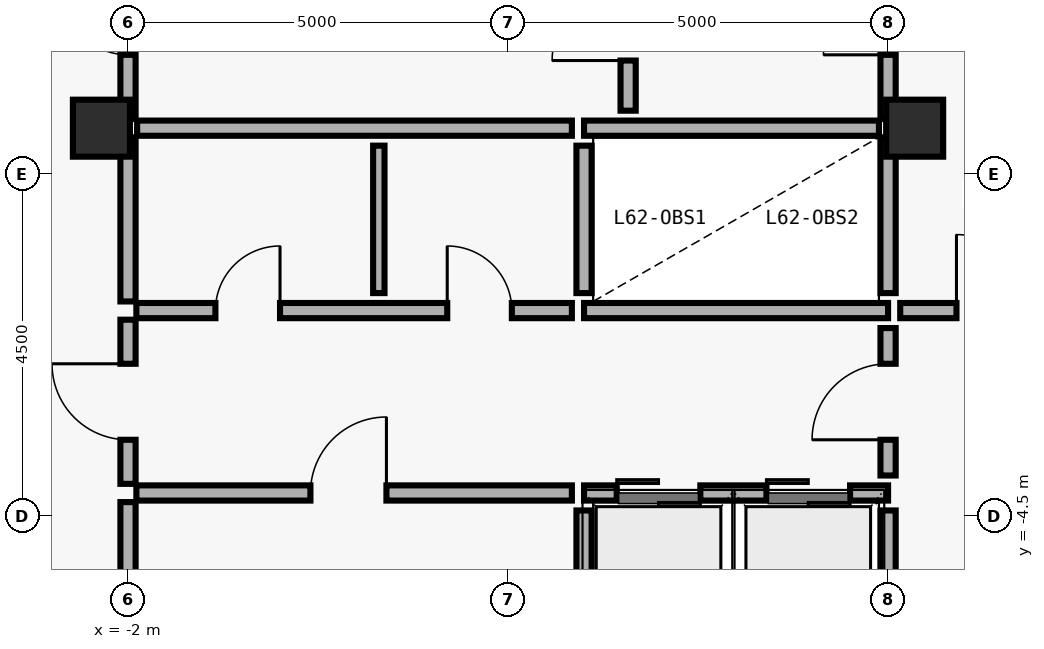
"""IFC4 building model, lengths in metres.
Left out: names, types, materials, properties, quantities, classifications, styles, units other than length and angle.
Written with IfcOpenShell. Run it as: python <this file> out.ifc"""

import sys

from ifc_helpers import new_model, si_unit, direction, frame, frame_2d, origin, origin_2d, place, context, subcontext, project, spatial, rectangle, extrude, element, fill, save


model = new_model("IFC4")
c1 = context("Model", 3, precision=1e-05, world=origin(), true_north=direction((0.0, 1.0)))
c2 = subcontext(c1, "Body", "Model", "MODEL_VIEW")
j1 = project(units=[si_unit("LENGTHUNIT", "METRE"), si_unit("PLANEANGLEUNIT", "RADIAN")], contexts=[c1])
p1 = place(None, origin())
s1 = spatial("IfcSite", under=j1, at=p1, CompositionType="ELEMENT")
p2 = place(p1, origin())
s2 = spatial("IfcBuilding", under=s1, at=p2, CompositionType="ELEMENT")
p3 = place(p2, frame((0.0, 0.0, 245.4)))
s3 = spatial("IfcBuildingStorey", under=s2, at=p3, CompositionType="ELEMENT", Elevation=245.4)
for number, where, z_axis, x_axis in (
    (1, (-2.35, 0.6, 0.0), (0.0, 0.0, 1.0), (1.0, 0.0, 0.0)),
    (2, (8.35, 0.6, 0.0), (0.0, 0.0, 1.0), (1.0, 0.0, 0.0)),
):
    element("IfcColumn", number, at=place(p3, frame(where, z_axis=z_axis, x_axis=x_axis)), inside=s3, PredefinedType="COLUMN", context=c2, shape_type="SweptSolid", body=[
        extrude(rectangle(XDim=0.75, YDim=0.75, at=origin_2d()), origin(), (0.0, 0.0, 1.0), 3.575),
    ])
p4 = place(p3, frame((4.0, 0.6, 0.0), z_axis=(0.0, 0.0, 1.0), x_axis=(1.0, 0.0, 0.0)))
e3 = element("IfcWall", 3, at=p4, inside=s3, PredefinedType="SOLIDWALL", context=c2, shape_type="SweptSolid", body=[
    extrude(rectangle(XDim=3.88, YDim=0.2, at=frame_2d((1.94, 0.0))), origin(), (0.0, 0.0, 1.0), 3.072),
])
p5 = place(p3, frame((4.0, -1.8, 0.0), z_axis=(0.0, 0.0, 1.0), x_axis=(1.0, 0.0, 0.0)))
e4 = element("IfcWall", 4, at=p5, inside=s3, PredefinedType="SOLIDWALL", context=c2, shape_type="SweptSolid", body=[
    extrude(rectangle(XDim=4.0, YDim=0.2, at=frame_2d((2.0, 0.0))), origin(), (0.0, 0.0, 1.0), 3.36),
])
p6 = place(p3, frame((4.0, -1.57, 0.0), z_axis=(0.0, 0.0, 1.0), x_axis=(0.0, 1.0, 0.0)))
e5 = element("IfcWall", 5, at=p6, inside=s3, PredefinedType="SOLIDWALL", context=c2, shape_type="SweptSolid", body=[
    extrude(rectangle(XDim=1.94, YDim=0.2, at=frame_2d((0.97, 0.0))), origin(), (0.0, 0.0, 1.0), 3.36),
])
p7 = place(p3, frame((8.0, -1.57, 0.0), z_axis=(0.0, 0.0, 1.0), x_axis=(0.0, 1.0, 0.0)))
e6 = element("IfcWall", 6, at=p7, inside=s3, PredefinedType="SOLIDWALL", context=c2, shape_type="SweptSolid", body=[
    extrude(rectangle(XDim=2.05, YDim=0.2, at=frame_2d((1.025, 0.0))), origin(), (0.0, 0.0, 1.0), 3.072),
])
p8 = place(p3, frame((4.0, -4.2, 0.0), z_axis=(0.0, 0.0, 1.0), x_axis=(1.0, 0.0, 0.0)))
e7 = element("IfcWall", 7, at=p8, inside=s3, PredefinedType="SOLIDWALL", context=c2, shape_type="SweptSolid", body=[
    extrude(rectangle(XDim=4.0, YDim=0.2, at=frame_2d((2.0, 0.0))), origin(), (0.0, 0.0, 1.0), 3.36),
])
p9 = place(p8, frame((0.43, 0.0, 0.0)))
e8 = element("IfcOpeningElement", 8, at=p9, cuts=e7, PredefinedType="OPENING", context=c2, shape_type="SweptSolid", body=[
    extrude(rectangle(XDim=1.1, YDim=2.2, at=frame_2d((0.55, 1.1))), frame((0.0, 0.11, 0.0), z_axis=(0.0, -1.0, 0.0), x_axis=(1.0, 0.0, 0.0)), (0.0, 0.0, 1.0), 0.22),
])
p10 = place(p8, frame((2.4, 0.0, 0.0)))
e9 = element("IfcOpeningElement", 9, at=p10, cuts=e7, PredefinedType="OPENING", context=c2, shape_type="SweptSolid", body=[
    extrude(rectangle(XDim=1.1, YDim=2.2, at=frame_2d((0.55, 1.1))), frame((0.0, 0.11, 0.0), z_axis=(0.0, -1.0, 0.0), x_axis=(1.0, 0.0, 0.0)), (0.0, 0.0, 1.0), 0.22),
])
p11 = place(p3, frame((4.0, -6.37, 0.0), z_axis=(0.0, 0.0, 1.0), x_axis=(0.0, 1.0, 0.0)))
e10 = element("IfcWall", 10, at=p11, inside=s3, PredefinedType="SOLIDWALL", context=c2, shape_type="SweptSolid", body=[
    extrude(rectangle(XDim=1.94, YDim=0.2, at=frame_2d((0.97, 0.0))), origin(), (0.0, 0.0, 1.0), 3.36),
])
p12 = place(p3, frame((8.0, -6.37, 0.0), z_axis=(0.0, 0.0, 1.0), x_axis=(0.0, 1.0, 0.0)))
e11 = element("IfcWall", 11, at=p12, inside=s3, PredefinedType="SOLIDWALL", context=c2, shape_type="SweptSolid", body=[
    extrude(rectangle(XDim=1.94, YDim=0.2, at=frame_2d((0.97, 0.0))), origin(), (0.0, 0.0, 1.0), 3.072),
])
p13 = place(p3, frame((4.58, 0.83, 0.0), z_axis=(0.0, 0.0, 1.0), x_axis=(0.0, 1.0, 0.0)))
e12 = element("IfcWall", 12, at=p13, inside=s3, PredefinedType="MOVABLE", context=c2, shape_type="SweptSolid", body=[
    extrude(rectangle(XDim=2.24, YDim=0.2, at=frame_2d((1.12, 0.0))), origin(), (0.0, 0.0, 1.0), 3.36),
])
p14 = place(p13, frame((0.66, 0.0, 0.0)))
e13 = element("IfcOpeningElement", 13, at=p14, cuts=e12, PredefinedType="OPENING", context=c2, shape_type="SweptSolid", body=[
    extrude(rectangle(XDim=1.0, YDim=2.1, at=frame_2d((0.5, 1.05))), frame((0.0, 0.11, 0.0), z_axis=(0.0, -1.0, 0.0), x_axis=(1.0, 0.0, 0.0)), (0.0, 0.0, 1.0), 0.22),
])
p15 = place(p3, frame((-2.0, 0.72, 0.0), z_axis=(0.0, 0.0, 1.0), x_axis=(0.0, 1.0, 0.0)))
e14 = element("IfcWall", 14, at=p15, inside=s3, PredefinedType="MOVABLE", context=c2, shape_type="SweptSolid", body=[
    extrude(rectangle(XDim=2.35, YDim=0.2, at=frame_2d((1.175, 0.0))), origin(), (0.0, 0.0, 1.0), 2.692),
])
p16 = place(p15, frame((0.845, 0.0, 0.0)))
e15 = element("IfcOpeningElement", 15, at=p16, cuts=e14, PredefinedType="OPENING", context=c2, shape_type="SweptSolid", body=[
    extrude(rectangle(XDim=0.85, YDim=2.1, at=frame_2d((0.425, 1.05))), frame((0.0, 0.11, 0.0), z_axis=(0.0, -1.0, 0.0), x_axis=(1.0, 0.0, 0.0)), (0.0, 0.0, 1.0), 0.22),
])
p17 = place(p3, frame((8.0, 0.72, 0.0), z_axis=(0.0, 0.0, 1.0), x_axis=(0.0, 1.0, 0.0)))
e16 = element("IfcWall", 16, at=p17, inside=s3, PredefinedType="MOVABLE", context=c2, shape_type="SweptSolid", body=[
    extrude(rectangle(XDim=2.35, YDim=0.2, at=frame_2d((1.175, 0.0))), origin(), (0.0, 0.0, 1.0), 2.692),
])
p18 = place(p17, frame((0.845, 0.0, 0.0)))
e17 = element("IfcOpeningElement", 17, at=p18, cuts=e16, PredefinedType="OPENING", context=c2, shape_type="SweptSolid", body=[
    extrude(rectangle(XDim=0.85, YDim=2.1, at=frame_2d((0.425, 1.05))), frame((0.0, 0.11, 0.0), z_axis=(0.0, -1.0, 0.0), x_axis=(1.0, 0.0, 0.0)), (0.0, 0.0, 1.0), 0.22),
])
p19 = place(p3, frame((-2.0, -4.08, 0.0), z_axis=(0.0, 0.0, 1.0), x_axis=(0.0, 1.0, 0.0)))
e18 = element("IfcWall", 18, at=p19, inside=s3, PredefinedType="MOVABLE", context=c2, shape_type="SweptSolid", body=[
    extrude(rectangle(XDim=2.16, YDim=0.2, at=frame_2d((1.08, 0.0))), origin(), (0.0, 0.0, 1.0), 3.072),
])
p20 = place(p19, frame((0.58, 0.0, 0.0)))
e19 = element("IfcOpeningElement", 19, at=p20, cuts=e18, PredefinedType="OPENING", context=c2, shape_type="SweptSolid", body=[
    extrude(rectangle(XDim=1.0, YDim=2.1, at=frame_2d((0.5, 1.05))), frame((0.0, 0.11, 0.0), z_axis=(0.0, -1.0, 0.0), x_axis=(1.0, 0.0, 0.0)), (0.0, 0.0, 1.0), 0.22),
])
p21 = place(p3, frame((8.0, -3.97, 0.0), z_axis=(0.0, 0.0, 1.0), x_axis=(0.0, 1.0, 0.0)))
e20 = element("IfcWall", 20, at=p21, inside=s3, PredefinedType="MOVABLE", context=c2, shape_type="SweptSolid", body=[
    extrude(rectangle(XDim=1.94, YDim=0.2, at=frame_2d((0.97, 0.0))), origin(), (0.0, 0.0, 1.0), 3.072),
])
p22 = place(p21, frame((0.47, 0.0, 0.0)))
e21 = element("IfcOpeningElement", 21, at=p22, cuts=e20, PredefinedType="OPENING", context=c2, shape_type="SweptSolid", body=[
    extrude(rectangle(XDim=1.0, YDim=2.1, at=frame_2d((0.5, 1.05))), frame((0.0, 0.11, 0.0), z_axis=(0.0, -1.0, 0.0), x_axis=(1.0, 0.0, 0.0)), (0.0, 0.0, 1.0), 0.22),
])
p23 = place(p3, frame((-1.89, -1.8, 0.0), z_axis=(0.0, 0.0, 1.0), x_axis=(1.0, 0.0, 0.0)))
e22 = element("IfcWall", 22, at=p23, inside=s3, PredefinedType="MOVABLE", context=c2, shape_type="SweptSolid", body=[
    extrude(rectangle(XDim=5.73, YDim=0.2, at=frame_2d((2.865, 0.0))), origin(), (0.0, 0.0, 1.0), 3.36),
])
p24 = place(p23, frame((1.04, 0.0, 0.0)))
e23 = element("IfcOpeningElement", 23, at=p24, cuts=e22, PredefinedType="OPENING", context=c2, shape_type="SweptSolid", body=[
    extrude(rectangle(XDim=0.85, YDim=2.1, at=frame_2d((0.425, 1.05))), frame((0.0, 0.11, 0.0), z_axis=(0.0, -1.0, 0.0), x_axis=(1.0, 0.0, 0.0)), (0.0, 0.0, 1.0), 0.22),
])
p25 = place(p23, frame((4.09, 0.0, 0.0)))
e24 = element("IfcOpeningElement", 24, at=p25, cuts=e22, PredefinedType="OPENING", context=c2, shape_type="SweptSolid", body=[
    extrude(rectangle(XDim=0.85, YDim=2.1, at=frame_2d((0.425, 1.05))), frame((0.0, 0.11, 0.0), z_axis=(0.0, -1.0, 0.0), x_axis=(1.0, 0.0, 0.0)), (0.0, 0.0, 1.0), 0.22),
])
p26 = place(p3, frame((-1.89, -4.2, 0.0), z_axis=(0.0, 0.0, 1.0), x_axis=(1.0, 0.0, 0.0)))
e25 = element("IfcWall", 25, at=p26, inside=s3, PredefinedType="MOVABLE", context=c2, shape_type="SweptSolid", body=[
    extrude(rectangle(XDim=5.73, YDim=0.2, at=frame_2d((2.865, 0.0))), origin(), (0.0, 0.0, 1.0), 3.36),
])
p27 = place(p26, frame((2.29, 0.0, 0.0)))
e26 = element("IfcOpeningElement", 26, at=p27, cuts=e25, PredefinedType="OPENING", context=c2, shape_type="SweptSolid", body=[
    extrude(rectangle(XDim=1.0, YDim=2.1, at=frame_2d((0.5, 1.05))), frame((0.0, 0.11, 0.0), z_axis=(0.0, -1.0, 0.0), x_axis=(1.0, 0.0, 0.0)), (0.0, 0.0, 1.0), 0.22),
])
p28 = place(p3, frame((8.16, -1.8, 0.0), z_axis=(0.0, 0.0, 1.0), x_axis=(1.0, 0.0, 0.0)))
e27 = element("IfcWall", 27, at=p28, inside=s3, PredefinedType="MOVABLE", context=c2, shape_type="SweptSolid", body=[
    extrude(rectangle(XDim=2.64, YDim=0.2, at=frame_2d((1.32, 0.0))), origin(), (0.0, 0.0, 1.0), 3.36),
])
p29 = place(p28, frame((0.74, 0.0, 0.0)))
e28 = element("IfcOpeningElement", 28, at=p29, cuts=e27, PredefinedType="OPENING", context=c2, shape_type="SweptSolid", body=[
    extrude(rectangle(XDim=1.0, YDim=2.1, at=frame_2d((0.5, 1.05))), frame((0.0, 0.11, 0.0), z_axis=(0.0, -1.0, 0.0), x_axis=(1.0, 0.0, 0.0)), (0.0, 0.0, 1.0), 0.22),
])
p30 = place(p3, frame((-1.88, 0.6, 0.0), z_axis=(0.0, 0.0, 1.0), x_axis=(1.0, 0.0, 0.0)))
e29 = element("IfcWall", 29, at=p30, inside=s3, PredefinedType="MOVABLE", context=c2, shape_type="SweptSolid", body=[
    extrude(rectangle(XDim=5.72, YDim=0.2, at=frame_2d((2.86, 0.0))), origin(), (0.0, 0.0, 1.0), 3.072),
])
p31 = place(p3, frame((1.3, -1.57, 0.0), z_axis=(0.0, 0.0, 1.0), x_axis=(0.0, 1.0, 0.0)))
e30 = element("IfcWall", 30, at=p31, inside=s3, PredefinedType="PARTITIONING", context=c2, shape_type="SweptSolid", body=[
    extrude(rectangle(XDim=1.94, YDim=0.15, at=frame_2d((0.97, 0.0))), origin(), (0.0, 0.0, 1.0), 3.36),
])
p32 = place(p3, frame((-2.0, -1.68, 0.0), z_axis=(0.0, 0.0, 1.0), x_axis=(0.0, 1.0, 0.0)))
e31 = element("IfcWall", 31, at=p32, inside=s3, PredefinedType="MOVABLE", context=c2, shape_type="SweptSolid", body=[
    extrude(rectangle(XDim=2.16, YDim=0.2, at=frame_2d((1.08, 0.0))), origin(), (0.0, 0.0, 1.0), 3.072),
])
p33 = place(p3, frame((-2.0, -6.37, 0.0), z_axis=(0.0, 0.0, 1.0), x_axis=(0.0, 1.0, 0.0)))
e32 = element("IfcWall", 32, at=p33, inside=s3, PredefinedType="MOVABLE", context=c2, shape_type="SweptSolid", body=[
    extrude(rectangle(XDim=2.05, YDim=0.2, at=frame_2d((1.025, 0.0))), origin(), (0.0, 0.0, 1.0), 3.072),
])
p34 = place(p14, origin())
e33 = element("IfcDoor", 33, at=p34, inside=s3, OperationType="SINGLE_SWING_LEFT", PredefinedType="DOOR", context=c2, shape_type="SweptSolid", body=[
    extrude(rectangle(XDim=1.0, YDim=2.1, at=frame_2d((0.5, 1.05))), frame((0.0, 0.025, 0.0), z_axis=(0.0, -1.0, 0.0), x_axis=(1.0, 0.0, 0.0)), (0.0, 0.0, 1.0), 0.05),
])
fill(e13, e33)
p35 = place(p16, origin())
e34 = element("IfcDoor", 34, at=p35, inside=s3, OperationType="SINGLE_SWING_RIGHT", PredefinedType="DOOR", context=c2, shape_type="SweptSolid", body=[
    extrude(rectangle(XDim=0.85, YDim=2.1, at=frame_2d((0.425, 1.05))), frame((0.0, 0.025, 0.0), z_axis=(0.0, -1.0, 0.0), x_axis=(1.0, 0.0, 0.0)), (0.0, 0.0, 1.0), 0.05),
])
fill(e15, e34)
p36 = place(p18, origin())
e35 = element("IfcDoor", 35, at=p36, inside=s3, OperationType="SINGLE_SWING_LEFT", PredefinedType="DOOR", context=c2, shape_type="SweptSolid", body=[
    extrude(rectangle(XDim=0.85, YDim=2.1, at=frame_2d((0.425, 1.05))), frame((0.0, 0.025, 0.0), z_axis=(0.0, -1.0, 0.0), x_axis=(1.0, 0.0, 0.0)), (0.0, 0.0, 1.0), 0.05),
])
fill(e17, e35)
p37 = place(p20, origin())
e36 = element("IfcDoor", 36, at=p37, inside=s3, OperationType="SINGLE_SWING_RIGHT", PredefinedType="DOOR", context=c2, shape_type="SweptSolid", body=[
    extrude(rectangle(XDim=1.0, YDim=2.1, at=frame_2d((0.5, 1.05))), frame((0.0, 0.025, 0.0), z_axis=(0.0, -1.0, 0.0), x_axis=(1.0, 0.0, 0.0)), (0.0, 0.0, 1.0), 0.05),
])
fill(e19, e36)
p38 = place(p22, origin())
e37 = element("IfcDoor", 37, at=p38, inside=s3, OperationType="SINGLE_SWING_LEFT", PredefinedType="DOOR", context=c2, shape_type="SweptSolid", body=[
    extrude(rectangle(XDim=1.0, YDim=2.1, at=frame_2d((0.5, 1.05))), frame((0.0, 0.025, 0.0), z_axis=(0.0, -1.0, 0.0), x_axis=(1.0, 0.0, 0.0)), (0.0, 0.0, 1.0), 0.05),
])
fill(e21, e37)
p39 = place(p24, origin())
e38 = element("IfcDoor", 38, at=p39, inside=s3, OperationType="SINGLE_SWING_RIGHT", PredefinedType="DOOR", context=c2, shape_type="SweptSolid", body=[
    extrude(rectangle(XDim=0.85, YDim=2.1, at=frame_2d((0.425, 1.05))), frame((0.0, 0.025, 0.0), z_axis=(0.0, -1.0, 0.0), x_axis=(1.0, 0.0, 0.0)), (0.0, 0.0, 1.0), 0.05),
])
fill(e23, e38)
p40 = place(p25, origin())
e39 = element("IfcDoor", 39, at=p40, inside=s3, OperationType="SINGLE_SWING_LEFT", PredefinedType="DOOR", context=c2, shape_type="SweptSolid", body=[
    extrude(rectangle(XDim=0.85, YDim=2.1, at=frame_2d((0.425, 1.05))), frame((0.0, 0.025, 0.0), z_axis=(0.0, -1.0, 0.0), x_axis=(1.0, 0.0, 0.0)), (0.0, 0.0, 1.0), 0.05),
])
fill(e24, e39)
p41 = place(p27, origin())
e40 = element("IfcDoor", 40, at=p41, inside=s3, OperationType="SINGLE_SWING_RIGHT", PredefinedType="DOOR", context=c2, shape_type="SweptSolid", body=[
    extrude(rectangle(XDim=1.0, YDim=2.1, at=frame_2d((0.5, 1.05))), frame((0.0, 0.025, 0.0), z_axis=(0.0, -1.0, 0.0), x_axis=(1.0, 0.0, 0.0)), (0.0, 0.0, 1.0), 0.05),
])
fill(e26, e40)
p42 = place(p29, origin())
e41 = element("IfcDoor", 41, at=p42, inside=s3, OperationType="SINGLE_SWING_LEFT", PredefinedType="DOOR", context=c2, shape_type="SweptSolid", body=[
    extrude(rectangle(XDim=1.0, YDim=2.1, at=frame_2d((0.5, 1.05))), frame((0.0, 0.025, 0.0), z_axis=(0.0, -1.0, 0.0), x_axis=(1.0, 0.0, 0.0)), (0.0, 0.0, 1.0), 0.05),
])
fill(e28, e41)
p43 = place(p9, origin())
e42 = element("IfcDoor", 42, at=p43, inside=s3, OperationType="DOUBLE_DOOR_SLIDING", PredefinedType="DOOR", context=c2, shape_type="SweptSolid", body=[
    extrude(rectangle(XDim=1.1, YDim=2.2, at=frame_2d((0.55, 1.1))), frame((0.0, 0.025, 0.0), z_axis=(0.0, -1.0, 0.0), x_axis=(1.0, 0.0, 0.0)), (0.0, 0.0, 1.0), 0.05),
])
fill(e8, e42)
p44 = place(p10, origin())
e43 = element("IfcDoor", 43, at=p44, inside=s3, OperationType="DOUBLE_DOOR_SLIDING", PredefinedType="DOOR", context=c2, shape_type="SweptSolid", body=[
    extrude(rectangle(XDim=1.1, YDim=2.2, at=frame_2d((0.55, 1.1))), frame((0.0, 0.025, 0.0), z_axis=(0.0, -1.0, 0.0), x_axis=(1.0, 0.0, 0.0)), (0.0, 0.0, 1.0), 0.05),
])
fill(e9, e43)
save(model, sys.argv[1])
